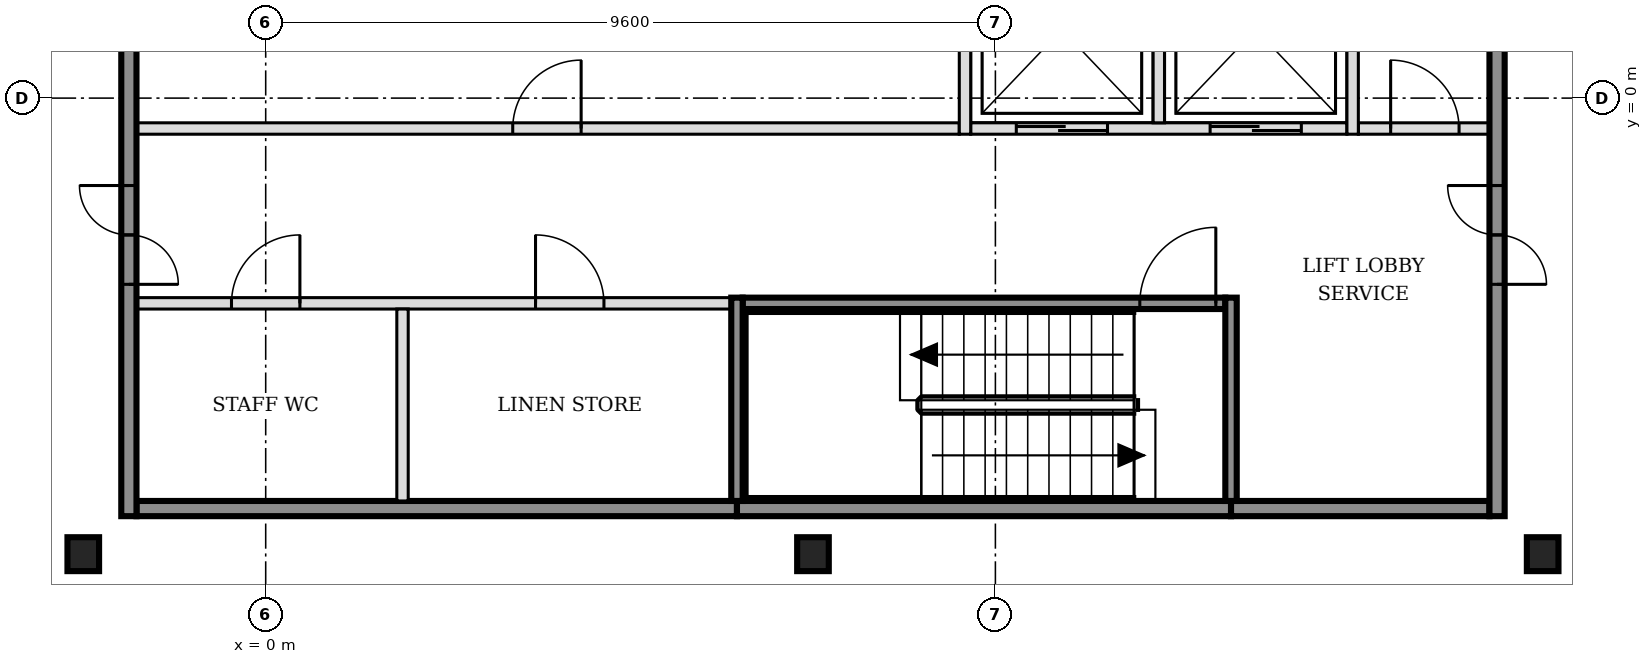
"""IFC4 building model, lengths in metres.
Left out: names, types, materials, properties, quantities, classifications, styles, units other than length and angle.
Written with IfcOpenShell. Run it as: python <this file> out.ifc"""

import sys

from ifc_helpers import new_model, si_unit, direction, frame, frame_2d, origin, origin_2d, place, context, subcontext, project, spatial, rectangle, i_section, extrude, element, fill, save


model = new_model("IFC4")
c1 = context("Model", 3, precision=1e-05, world=origin(), true_north=direction((0.0, 1.0)))
c2 = subcontext(c1, "Body", "Model", "MODEL_VIEW")
j1 = project(units=[si_unit("LENGTHUNIT", "METRE"), si_unit("PLANEANGLEUNIT", "RADIAN")], contexts=[c1])
p1 = place(None, origin())
s1 = spatial("IfcSite", under=j1, at=p1, CompositionType="ELEMENT")
p2 = place(p1, origin())
s2 = spatial("IfcBuilding", under=s1, at=p2, CompositionType="ELEMENT")
p3 = place(p2, frame((0.0, 0.0, 186.6)))
s3 = spatial("IfcBuildingStorey", under=s2, at=p3, CompositionType="ELEMENT", Elevation=186.6)
for number, where, z_axis, x_axis in (
    (1, (-2.4, -6.0, -0.15), (0.0, 0.0, 1.0), (1.0, 0.0, 0.0)),
    (2, (7.2, -6.0, -0.15), (0.0, 0.0, 1.0), (1.0, 0.0, 0.0)),
    (3, (16.8, -6.0, -0.15), (0.0, 0.0, 1.0), (1.0, 0.0, 0.0)),
):
    element("IfcColumn", number, at=place(p3, frame(where, z_axis=z_axis, x_axis=x_axis)), inside=s3, PredefinedType="COLUMN", context=c2, shape_type="SweptSolid", body=[
        extrude(i_section(OverallWidth=0.416, OverallDepth=0.446, WebThickness=0.039, FlangeThickness=0.063, FilletRadius=0.015, at=origin_2d()), origin(), (0.0, 0.0, 1.0), 3.6),
    ])
p4 = place(p3, frame((-1.7, -5.4, 0.0), z_axis=(0.0, 0.0, 1.0), x_axis=(1.0, 0.0, 0.0)))
e4 = element("IfcWall", 4, at=p4, inside=s3, PredefinedType="SOLIDWALL", context=c2, shape_type="SweptSolid", body=[
    extrude(rectangle(XDim=7.9, YDim=0.2, at=frame_2d((3.95, 0.0))), origin(), (0.0, 0.0, 1.0), 3.45),
])
p5 = place(p3, frame((6.2, -5.4, 0.0), z_axis=(0.0, 0.0, 1.0), x_axis=(1.0, 0.0, 0.0)))
e5 = element("IfcWall", 5, at=p5, inside=s3, PredefinedType="SOLIDWALL", context=c2, shape_type="SweptSolid", body=[
    extrude(rectangle(XDim=6.5, YDim=0.2, at=frame_2d((3.25, 0.0))), origin(), (0.0, 0.0, 1.0), 3.45),
])
p6 = place(p3, frame((12.7, -5.4, 0.0), z_axis=(0.0, 0.0, 1.0), x_axis=(1.0, 0.0, 0.0)))
e6 = element("IfcWall", 6, at=p6, inside=s3, PredefinedType="SOLIDWALL", context=c2, shape_type="SweptSolid", body=[
    extrude(rectangle(XDim=3.4, YDim=0.2, at=frame_2d((1.7, 0.0))), origin(), (0.0, 0.0, 1.0), 3.45),
])
p7 = place(p3, frame((-1.7, -2.7, 0.0), z_axis=(0.0, 0.0, 1.0), x_axis=(1.0, 0.0, 0.0)))
e7 = element("IfcWall", 7, at=p7, inside=s3, PredefinedType="PARTITIONING", context=c2, shape_type="SweptSolid", body=[
    extrude(rectangle(XDim=7.825, YDim=0.15, at=frame_2d((3.913, 0.0))), origin(), (0.0, 0.0, 1.0), 3.45),
])
p8 = place(p7, frame((1.25, 0.0, 0.0)))
e8 = element("IfcOpeningElement", 8, at=p8, cuts=e7, PredefinedType="OPENING", context=c2, shape_type="SweptSolid", body=[
    extrude(rectangle(XDim=0.9, YDim=2.1, at=frame_2d((0.45, 1.05))), frame((0.0, 0.085, 0.0), z_axis=(0.0, -1.0, 0.0), x_axis=(1.0, 0.0, 0.0)), (0.0, 0.0, 1.0), 0.17),
])
p9 = place(p7, frame((5.25, 0.0, 0.0)))
e9 = element("IfcOpeningElement", 9, at=p9, cuts=e7, PredefinedType="OPENING", context=c2, shape_type="SweptSolid", body=[
    extrude(rectangle(XDim=0.9, YDim=2.1, at=frame_2d((0.45, 1.05))), frame((0.0, 0.085, 0.0), z_axis=(0.0, -1.0, 0.0), x_axis=(1.0, 0.0, 0.0)), (0.0, 0.0, 1.0), 0.17),
])
p10 = place(p3, frame((6.275, -2.7, 0.0), z_axis=(0.0, 0.0, 1.0), x_axis=(1.0, 0.0, 0.0)))
e10 = element("IfcWall", 10, at=p10, inside=s3, PredefinedType="SOLIDWALL", context=c2, shape_type="SweptSolid", body=[
    extrude(rectangle(XDim=6.35, YDim=0.15, at=frame_2d((3.175, 0.0))), origin(), (0.0, 0.0, 1.0), 3.45),
])
p11 = place(p10, frame((5.225, 0.0, 0.0)))
e11 = element("IfcOpeningElement", 11, at=p11, cuts=e10, PredefinedType="OPENING", context=c2, shape_type="SweptSolid", body=[
    extrude(rectangle(XDim=1.0, YDim=2.1, at=frame_2d((0.5, 1.05))), frame((0.0, 0.085, 0.0), z_axis=(0.0, -1.0, 0.0), x_axis=(1.0, 0.0, 0.0)), (0.0, 0.0, 1.0), 0.17),
])
p12 = place(p3, frame((-1.7, -0.4, 0.0), z_axis=(0.0, 0.0, 1.0), x_axis=(1.0, 0.0, 0.0)))
e12 = element("IfcWall", 12, at=p12, inside=s3, PredefinedType="PARTITIONING", context=c2, shape_type="SweptSolid", body=[
    extrude(rectangle(XDim=10.825, YDim=0.15, at=frame_2d((5.413, 0.0))), origin(), (0.0, 0.0, 1.0), 3.45),
])
p13 = place(p12, frame((4.95, 0.0, 0.0)))
e13 = element("IfcOpeningElement", 13, at=p13, cuts=e12, PredefinedType="OPENING", context=c2, shape_type="SweptSolid", body=[
    extrude(rectangle(XDim=0.9, YDim=2.1, at=frame_2d((0.45, 1.05))), frame((0.0, 0.085, 0.0), z_axis=(0.0, -1.0, 0.0), x_axis=(1.0, 0.0, 0.0)), (0.0, 0.0, 1.0), 0.17),
])
p14 = place(p3, frame((9.275, -0.4, 0.0), z_axis=(0.0, 0.0, 1.0), x_axis=(1.0, 0.0, 0.0)))
e14 = element("IfcWall", 14, at=p14, inside=s3, PredefinedType="SOLIDWALL", context=c2, shape_type="SweptSolid", body=[
    extrude(rectangle(XDim=4.95, YDim=0.15, at=frame_2d((2.475, 0.0))), origin(), (0.0, 0.0, 1.0), 3.45),
])
p15 = place(p14, frame((0.6, 0.0, 0.0)))
e15 = element("IfcOpeningElement", 15, at=p15, cuts=e14, PredefinedType="OPENING", context=c2, shape_type="SweptSolid", body=[
    extrude(rectangle(XDim=1.2, YDim=2.1, at=frame_2d((0.6, 1.05))), frame((0.0, 0.085, 0.0), z_axis=(0.0, -1.0, 0.0), x_axis=(1.0, 0.0, 0.0)), (0.0, 0.0, 1.0), 0.17),
])
p16 = place(p14, frame((3.15, 0.0, 0.0)))
e16 = element("IfcOpeningElement", 16, at=p16, cuts=e14, PredefinedType="OPENING", context=c2, shape_type="SweptSolid", body=[
    extrude(rectangle(XDim=1.2, YDim=2.1, at=frame_2d((0.6, 1.05))), frame((0.0, 0.085, 0.0), z_axis=(0.0, -1.0, 0.0), x_axis=(1.0, 0.0, 0.0)), (0.0, 0.0, 1.0), 0.17),
])
p17 = place(p3, frame((14.375, -0.4, 0.0), z_axis=(0.0, 0.0, 1.0), x_axis=(1.0, 0.0, 0.0)))
e17 = element("IfcWall", 17, at=p17, inside=s3, PredefinedType="PARTITIONING", context=c2, shape_type="SweptSolid", body=[
    extrude(rectangle(XDim=1.725, YDim=0.15, at=frame_2d((0.863, 0.0))), origin(), (0.0, 0.0, 1.0), 3.45),
])
p18 = place(p17, frame((0.425, 0.0, 0.0)))
e18 = element("IfcOpeningElement", 18, at=p18, cuts=e17, PredefinedType="OPENING", context=c2, shape_type="SweptSolid", body=[
    extrude(rectangle(XDim=0.9, YDim=2.1, at=frame_2d((0.45, 1.05))), frame((0.0, 0.085, 0.0), z_axis=(0.0, -1.0, 0.0), x_axis=(1.0, 0.0, 0.0)), (0.0, 0.0, 1.0), 0.17),
])
p19 = place(p3, frame((-1.8, -5.5, 0.0), z_axis=(0.0, 0.0, 1.0), x_axis=(0.0, 1.0, 0.0)))
e19 = element("IfcWall", 19, at=p19, inside=s3, PredefinedType="SOLIDWALL", context=c2, shape_type="SweptSolid", body=[
    extrude(rectangle(XDim=15.8, YDim=0.2, at=frame_2d((7.9, 0.0))), origin(), (0.0, 0.0, 1.0), 3.45),
])
p20 = place(p19, frame((3.05, 0.0, 0.0)))
e20 = element("IfcOpeningElement", 20, at=p20, cuts=e19, PredefinedType="OPENING", context=c2, shape_type="SweptSolid", body=[
    extrude(rectangle(XDim=1.3, YDim=2.1, at=frame_2d((0.65, 1.05))), frame((0.0, 0.11, 0.0), z_axis=(0.0, -1.0, 0.0), x_axis=(1.0, 0.0, 0.0)), (0.0, 0.0, 1.0), 0.22),
])
p21 = place(p19, frame((11.45, 0.0, 0.0)))
e21 = element("IfcOpeningElement", 21, at=p21, cuts=e19, PredefinedType="OPENING", context=c2, shape_type="SweptSolid", body=[
    extrude(rectangle(XDim=1.3, YDim=2.1, at=frame_2d((0.65, 1.05))), frame((0.0, 0.11, 0.0), z_axis=(0.0, -1.0, 0.0), x_axis=(1.0, 0.0, 0.0)), (0.0, 0.0, 1.0), 0.22),
])
p22 = place(p3, frame((1.8, -5.3, 0.0), z_axis=(0.0, 0.0, 1.0), x_axis=(0.0, 1.0, 0.0)))
e22 = element("IfcWall", 22, at=p22, inside=s3, PredefinedType="PARTITIONING", context=c2, shape_type="SweptSolid", body=[
    extrude(rectangle(XDim=2.525, YDim=0.15, at=frame_2d((1.263, 0.0))), origin(), (0.0, 0.0, 1.0), 3.45),
])
p23 = place(p3, frame((6.2, -5.3, 0.0), z_axis=(0.0, 0.0, 1.0), x_axis=(0.0, 1.0, 0.0)))
e23 = element("IfcWall", 23, at=p23, inside=s3, PredefinedType="SOLIDWALL", context=c2, shape_type="SweptSolid", body=[
    extrude(rectangle(XDim=2.675, YDim=0.15, at=frame_2d((1.337, 0.0))), origin(), (0.0, 0.0, 1.0), 3.45),
])
p24 = place(p3, frame((9.2, -0.475, 0.0), z_axis=(0.0, 0.0, 1.0), x_axis=(0.0, 1.0, 0.0)))
e24 = element("IfcWall", 24, at=p24, inside=s3, PredefinedType="SOLIDWALL", context=c2, shape_type="SweptSolid", body=[
    extrude(rectangle(XDim=2.6, YDim=0.15, at=frame_2d((1.3, 0.0))), origin(), (0.0, 0.0, 1.0), 3.45),
])
p25 = place(p3, frame((11.75, -0.325, 0.0), z_axis=(0.0, 0.0, 1.0), x_axis=(0.0, 1.0, 0.0)))
e25 = element("IfcWall", 25, at=p25, inside=s3, PredefinedType="SOLIDWALL", context=c2, shape_type="SweptSolid", body=[
    extrude(rectangle(XDim=2.45, YDim=0.15, at=frame_2d((1.225, 0.0))), origin(), (0.0, 0.0, 1.0), 3.45),
])
p26 = place(p3, frame((12.7, -5.3, 0.0), z_axis=(0.0, 0.0, 1.0), x_axis=(0.0, 1.0, 0.0)))
e26 = element("IfcWall", 26, at=p26, inside=s3, PredefinedType="SOLIDWALL", context=c2, shape_type="SweptSolid", body=[
    extrude(rectangle(XDim=2.675, YDim=0.15, at=frame_2d((1.337, 0.0))), origin(), (0.0, 0.0, 1.0), 3.45),
])
p27 = place(p3, frame((14.3, -0.475, 0.0), z_axis=(0.0, 0.0, 1.0), x_axis=(0.0, 1.0, 0.0)))
e27 = element("IfcWall", 27, at=p27, inside=s3, PredefinedType="SOLIDWALL", context=c2, shape_type="SweptSolid", body=[
    extrude(rectangle(XDim=2.75, YDim=0.15, at=frame_2d((1.375, 0.0))), origin(), (0.0, 0.0, 1.0), 3.45),
])
p28 = place(p3, frame((16.2, -5.5, 0.0), z_axis=(0.0, 0.0, 1.0), x_axis=(0.0, 1.0, 0.0)))
e28 = element("IfcWall", 28, at=p28, inside=s3, PredefinedType="SOLIDWALL", context=c2, shape_type="SweptSolid", body=[
    extrude(rectangle(XDim=15.8, YDim=0.2, at=frame_2d((7.9, 0.0))), origin(), (0.0, 0.0, 1.0), 3.45),
])
p29 = place(p28, frame((3.05, 0.0, 0.0)))
e29 = element("IfcOpeningElement", 29, at=p29, cuts=e28, PredefinedType="OPENING", context=c2, shape_type="SweptSolid", body=[
    extrude(rectangle(XDim=1.3, YDim=2.1, at=frame_2d((0.65, 1.05))), frame((0.0, 0.11, 0.0), z_axis=(0.0, -1.0, 0.0), x_axis=(1.0, 0.0, 0.0)), (0.0, 0.0, 1.0), 0.22),
])
p30 = place(p28, frame((11.45, 0.0, 0.0)))
e30 = element("IfcOpeningElement", 30, at=p30, cuts=e28, PredefinedType="OPENING", context=c2, shape_type="SweptSolid", body=[
    extrude(rectangle(XDim=1.3, YDim=2.1, at=frame_2d((0.65, 1.05))), frame((0.0, 0.11, 0.0), z_axis=(0.0, -1.0, 0.0), x_axis=(1.0, 0.0, 0.0)), (0.0, 0.0, 1.0), 0.22),
])
p31 = place(p15, origin())
e31 = element("IfcDoor", 31, at=p31, inside=s3, OperationType="DOUBLE_DOOR_SLIDING", PredefinedType="DOOR", context=c2, shape_type="SweptSolid", body=[
    extrude(rectangle(XDim=1.2, YDim=2.1, at=frame_2d((0.6, 1.05))), frame((0.0, 0.025, 0.0), z_axis=(0.0, -1.0, 0.0), x_axis=(1.0, 0.0, 0.0)), (0.0, 0.0, 1.0), 0.05),
])
fill(e15, e31)
p32 = place(p16, origin())
e32 = element("IfcDoor", 32, at=p32, inside=s3, OperationType="DOUBLE_DOOR_SLIDING", PredefinedType="DOOR", context=c2, shape_type="SweptSolid", body=[
    extrude(rectangle(XDim=1.2, YDim=2.1, at=frame_2d((0.6, 1.05))), frame((0.0, 0.025, 0.0), z_axis=(0.0, -1.0, 0.0), x_axis=(1.0, 0.0, 0.0)), (0.0, 0.0, 1.0), 0.05),
])
fill(e16, e32)
p33 = place(p11, origin())
e33 = element("IfcDoor", 33, at=p33, inside=s3, OperationType="SINGLE_SWING_RIGHT", PredefinedType="DOOR", context=c2, shape_type="SweptSolid", body=[
    extrude(rectangle(XDim=1.0, YDim=2.1, at=frame_2d((0.5, 1.05))), frame((0.0, 0.025, 0.0), z_axis=(0.0, -1.0, 0.0), x_axis=(1.0, 0.0, 0.0)), (0.0, 0.0, 1.0), 0.05),
])
fill(e11, e33)
p34 = place(p20, origin())
e34 = element("IfcDoor", 34, at=p34, inside=s3, OperationType="DOUBLE_DOOR_SINGLE_SWING", PredefinedType="DOOR", context=c2, shape_type="SweptSolid", body=[
    extrude(rectangle(XDim=1.3, YDim=2.1, at=frame_2d((0.65, 1.05))), frame((0.0, 0.025, 0.0), z_axis=(0.0, -1.0, 0.0), x_axis=(1.0, 0.0, 0.0)), (0.0, 0.0, 1.0), 0.05),
])
fill(e20, e34)
p35 = place(p29, origin())
e35 = element("IfcDoor", 35, at=p35, inside=s3, OperationType="DOUBLE_DOOR_SINGLE_SWING", PredefinedType="DOOR", context=c2, shape_type="SweptSolid", body=[
    extrude(rectangle(XDim=1.3, YDim=2.1, at=frame_2d((0.65, 1.05))), frame((0.0, 0.025, 0.0), z_axis=(0.0, -1.0, 0.0), x_axis=(1.0, 0.0, 0.0)), (0.0, 0.0, 1.0), 0.05),
])
fill(e29, e35)
p36 = place(p18, origin())
e36 = element("IfcDoor", 36, at=p36, inside=s3, OperationType="SINGLE_SWING_LEFT", PredefinedType="DOOR", context=c2, shape_type="SweptSolid", body=[
    extrude(rectangle(XDim=0.9, YDim=2.1, at=frame_2d((0.45, 1.05))), frame((0.0, 0.025, 0.0), z_axis=(0.0, -1.0, 0.0), x_axis=(1.0, 0.0, 0.0)), (0.0, 0.0, 1.0), 0.05),
])
fill(e18, e36)
p37 = place(p8, origin())
e37 = element("IfcDoor", 37, at=p37, inside=s3, OperationType="SINGLE_SWING_RIGHT", PredefinedType="DOOR", context=c2, shape_type="SweptSolid", body=[
    extrude(rectangle(XDim=0.9, YDim=2.1, at=frame_2d((0.45, 1.05))), frame((0.0, 0.025, 0.0), z_axis=(0.0, -1.0, 0.0), x_axis=(1.0, 0.0, 0.0)), (0.0, 0.0, 1.0), 0.05),
])
fill(e8, e37)
p38 = place(p9, origin())
e38 = element("IfcDoor", 38, at=p38, inside=s3, OperationType="SINGLE_SWING_LEFT", PredefinedType="DOOR", context=c2, shape_type="SweptSolid", body=[
    extrude(rectangle(XDim=0.9, YDim=2.1, at=frame_2d((0.45, 1.05))), frame((0.0, 0.025, 0.0), z_axis=(0.0, -1.0, 0.0), x_axis=(1.0, 0.0, 0.0)), (0.0, 0.0, 1.0), 0.05),
])
fill(e9, e38)
p39 = place(p13, origin())
e39 = element("IfcDoor", 39, at=p39, inside=s3, OperationType="SINGLE_SWING_RIGHT", PredefinedType="DOOR", context=c2, shape_type="SweptSolid", body=[
    extrude(rectangle(XDim=0.9, YDim=2.1, at=frame_2d((0.45, 1.05))), frame((0.0, 0.025, 0.0), z_axis=(0.0, -1.0, 0.0), x_axis=(1.0, 0.0, 0.0)), (0.0, 0.0, 1.0), 0.05),
])
fill(e13, e39)
save(model, sys.argv[1])
